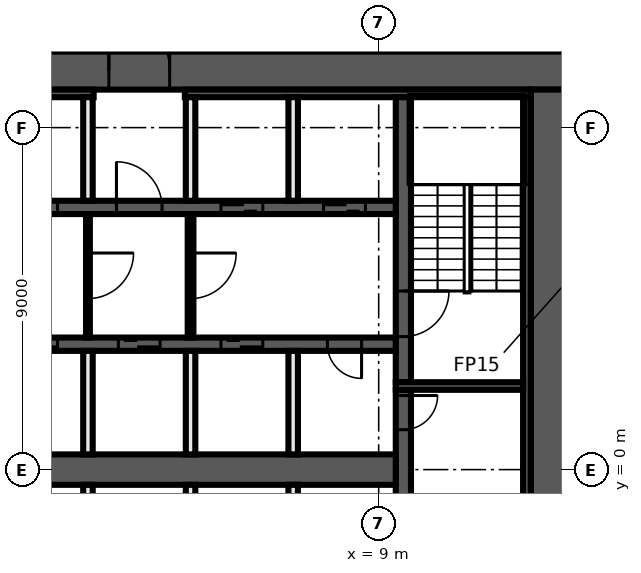
"""IFC4 building model, lengths in metres.
Left out: names, types, materials, properties, quantities, classifications, styles, units other than length and angle.
Written with IfcOpenShell. Run it as: python <this file> out.ifc"""

import sys

from ifc_helpers import new_model, si_unit, direction, frame, frame_2d, origin, place, context, subcontext, project, spatial, rectangle, extrude, element, fill, save


model = new_model("IFC4")
c1 = context("Model", 3, precision=1e-05, world=origin(), true_north=direction((0.0, 1.0)))
c2 = subcontext(c1, "Body", "Model", "MODEL_VIEW")
j1 = project(units=[si_unit("LENGTHUNIT", "METRE"), si_unit("PLANEANGLEUNIT", "RADIAN")], contexts=[c1])
p1 = place(None, origin())
s1 = spatial("IfcSite", under=j1, at=p1, CompositionType="ELEMENT")
p2 = place(p1, origin())
s2 = spatial("IfcBuilding", under=s1, at=p2, CompositionType="ELEMENT")
p3 = place(p2, frame((0.0, 0.0, 102.6)))
s3 = spatial("IfcBuildingStorey", under=s2, at=p3, CompositionType="ELEMENT", Elevation=102.6)
for number, where, z_axis, x_axis in (
    (1, (3.6, 11.0, 0.0), (0.0, 0.0, 1.0), (0.0, 1.0, 0.0)),
    (2, (1.8, 11.0, 0.0), (0.0, 0.0, 1.0), (0.0, 1.0, 0.0)),
):
    element("IfcWall", number, at=place(p3, frame(where, z_axis=z_axis, x_axis=x_axis)), inside=s3, PredefinedType="PARTITIONING", context=c2, shape_type="SweptSolid", body=[
        extrude(rectangle(XDim=1.175, YDim=0.15, at=frame_2d((0.587, 0.0))), origin(), (0.0, 0.0, 1.0), 3.3),
    ])
p4 = place(p3, frame((-14.0, 10.5, 0.0), z_axis=(0.0, 0.0, 1.0), x_axis=(1.0, 0.0, 0.0)))
e3 = element("IfcWall", 3, at=p4, inside=s3, PredefinedType="SHEAR", context=c2, shape_type="SweptSolid", body=[
    extrude(rectangle(XDim=28.0, YDim=1.0, at=frame_2d((14.0, 0.0))), origin(), (0.0, 0.0, 1.0), 3.3),
])
p5 = place(p4, frame((15.9, 0.0, 0.0)))
e4 = element("IfcOpeningElement", 4, at=p5, cuts=e3, PredefinedType="OPENING", context=c2, shape_type="SweptSolid", body=[
    extrude(rectangle(XDim=1.6, YDim=2.1, at=frame_2d((0.8, 1.05))), frame((0.0, 0.51, 0.0), z_axis=(0.0, -1.0, 0.0), x_axis=(1.0, 0.0, 0.0)), (0.0, 0.0, 1.0), 1.02),
])
p6 = place(p3, frame((13.5, 10.0, 0.0), z_axis=(0.0, 0.0, 1.0), x_axis=(0.0, -1.0, 0.0)))
e5 = element("IfcWall", 5, at=p6, inside=s3, PredefinedType="SHEAR", context=c2, shape_type="SweptSolid", body=[
    extrude(rectangle(XDim=20.0, YDim=1.0, at=frame_2d((10.0, 0.0))), origin(), (0.0, 0.0, 1.0), 3.3),
])
p7 = place(p3, frame((-13.0, 9.9, 0.0), z_axis=(0.0, 0.0, 1.0), x_axis=(1.0, 0.0, 0.0)))
e6 = element("IfcWall", 6, at=p7, inside=s3, PredefinedType="SHEAR", context=c2, shape_type="SweptSolid", body=[
    extrude(rectangle(XDim=14.5, YDim=0.2, at=frame_2d((7.25, 0.0))), origin(), (0.0, 0.0, 1.0), 3.3),
])
p8 = place(p3, frame((3.9, 9.9, 0.0), z_axis=(0.0, 0.0, 1.0), x_axis=(1.0, 0.0, 0.0)))
e7 = element("IfcWall", 7, at=p8, inside=s3, PredefinedType="SHEAR", context=c2, shape_type="SweptSolid", body=[
    extrude(rectangle(XDim=9.1, YDim=0.2, at=frame_2d((4.55, 0.0))), origin(), (0.0, 0.0, 1.0), 3.3),
])
p9 = place(p3, frame((12.9, 9.8, 0.0), z_axis=(0.0, 0.0, 1.0), x_axis=(0.0, -1.0, 0.0)))
e8 = element("IfcWall", 8, at=p9, inside=s3, PredefinedType="SHEAR", context=c2, shape_type="SweptSolid", body=[
    extrude(rectangle(XDim=19.6, YDim=0.2, at=frame_2d((9.8, 0.0))), origin(), (0.0, 0.0, 1.0), 3.3),
])
p10 = place(p3, frame((9.65, 2.1, 0.0), z_axis=(0.0, 0.0, 1.0), x_axis=(0.0, -1.0, 0.0)))
e9 = element("IfcWall", 9, at=p10, inside=s3, PredefinedType="SHEAR", context=c2, shape_type="SweptSolid", body=[
    extrude(rectangle(XDim=4.2, YDim=0.4, at=frame_2d((2.1, 0.0))), origin(), (0.0, 0.0, 1.0), 3.3),
])
p11 = place(p10, frame((0.15, 0.0, 0.0)))
e10 = element("IfcOpeningElement", 10, at=p11, cuts=e9, PredefinedType="OPENING", context=c2, shape_type="SweptSolid", body=[
    extrude(rectangle(XDim=0.9, YDim=2.1, at=frame_2d((0.45, 1.05))), frame((0.0, 0.21, 0.0), z_axis=(0.0, -1.0, 0.0), x_axis=(1.0, 0.0, 0.0)), (0.0, 0.0, 1.0), 0.42),
])
p12 = place(p3, frame((9.65, 9.8, 0.0), z_axis=(0.0, 0.0, 1.0), x_axis=(0.0, -1.0, 0.0)))
e11 = element("IfcWall", 11, at=p12, inside=s3, PredefinedType="SHEAR", context=c2, shape_type="SweptSolid", body=[
    extrude(rectangle(XDim=7.5, YDim=0.4, at=frame_2d((3.75, 0.0))), origin(), (0.0, 0.0, 1.0), 3.3),
])
p13 = place(p12, frame((5.1, 0.0, 0.0)))
e12 = element("IfcOpeningElement", 12, at=p13, cuts=e11, PredefinedType="OPENING", context=c2, shape_type="SweptSolid", body=[
    extrude(rectangle(XDim=1.2, YDim=2.1, at=frame_2d((0.6, 1.05))), frame((0.0, 0.21, 0.0), z_axis=(0.0, -1.0, 0.0), x_axis=(1.0, 0.0, 0.0)), (0.0, 0.0, 1.0), 0.42),
])
p14 = place(p3, frame((9.45, 2.2, 0.0), z_axis=(0.0, 0.0, 1.0), x_axis=(1.0, 0.0, 0.0)))
e13 = element("IfcWall", 13, at=p14, inside=s3, PredefinedType="SHEAR", context=c2, shape_type="SweptSolid", body=[
    extrude(rectangle(XDim=3.35, YDim=0.2, at=frame_2d((1.675, 0.0))), origin(), (0.0, 0.0, 1.0), 3.3),
])
p15 = place(p3, frame((-9.45, 6.9, 0.0), z_axis=(0.0, 0.0, 1.0), x_axis=(1.0, 0.0, 0.0)))
e14 = element("IfcWall", 14, at=p15, inside=s3, PredefinedType="SHEAR", context=c2, shape_type="SweptSolid", body=[
    extrude(rectangle(XDim=18.9, YDim=0.35, at=frame_2d((9.45, 0.0))), origin(), (0.0, 0.0, 1.0), 3.3),
])
p16 = place(p15, frame((0.8, 0.0, 0.0)))
e15 = element("IfcOpeningElement", 15, at=p16, cuts=e14, PredefinedType="OPENING", context=c2, shape_type="SweptSolid", body=[
    extrude(rectangle(XDim=1.1, YDim=2.1, at=frame_2d((0.55, 1.05))), frame((0.0, 0.185, 0.0), z_axis=(0.0, -1.0, 0.0), x_axis=(1.0, 0.0, 0.0)), (0.0, 0.0, 1.0), 0.37),
])
p17 = place(p15, frame((3.5, 0.0, 0.0)))
e16 = element("IfcOpeningElement", 16, at=p17, cuts=e14, PredefinedType="OPENING", context=c2, shape_type="SweptSolid", body=[
    extrude(rectangle(XDim=1.1, YDim=2.1, at=frame_2d((0.55, 1.05))), frame((0.0, 0.185, 0.0), z_axis=(0.0, -1.0, 0.0), x_axis=(1.0, 0.0, 0.0)), (0.0, 0.0, 1.0), 0.37),
])
p18 = place(p15, frame((6.2, 0.0, 0.0)))
e17 = element("IfcOpeningElement", 17, at=p18, cuts=e14, PredefinedType="OPENING", context=c2, shape_type="SweptSolid", body=[
    extrude(rectangle(XDim=1.1, YDim=2.1, at=frame_2d((0.55, 1.05))), frame((0.0, 0.185, 0.0), z_axis=(0.0, -1.0, 0.0), x_axis=(1.0, 0.0, 0.0)), (0.0, 0.0, 1.0), 0.37),
])
p19 = place(p15, frame((8.9, 0.0, 0.0)))
e18 = element("IfcOpeningElement", 18, at=p19, cuts=e14, PredefinedType="OPENING", context=c2, shape_type="SweptSolid", body=[
    extrude(rectangle(XDim=1.1, YDim=2.1, at=frame_2d((0.55, 1.05))), frame((0.0, 0.185, 0.0), z_axis=(0.0, -1.0, 0.0), x_axis=(1.0, 0.0, 0.0)), (0.0, 0.0, 1.0), 0.37),
])
p20 = place(p15, frame((11.55, 0.0, 0.0)))
e19 = element("IfcOpeningElement", 19, at=p20, cuts=e14, PredefinedType="OPENING", context=c2, shape_type="SweptSolid", body=[
    extrude(rectangle(XDim=1.2, YDim=2.1, at=frame_2d((0.6, 1.05))), frame((0.0, 0.185, 0.0), z_axis=(0.0, -1.0, 0.0), x_axis=(1.0, 0.0, 0.0)), (0.0, 0.0, 1.0), 0.37),
])
p21 = place(p15, frame((14.3, 0.0, 0.0)))
e20 = element("IfcOpeningElement", 20, at=p21, cuts=e14, PredefinedType="OPENING", context=c2, shape_type="SweptSolid", body=[
    extrude(rectangle(XDim=1.1, YDim=2.1, at=frame_2d((0.55, 1.05))), frame((0.0, 0.185, 0.0), z_axis=(0.0, -1.0, 0.0), x_axis=(1.0, 0.0, 0.0)), (0.0, 0.0, 1.0), 0.37),
])
p22 = place(p15, frame((17.0, 0.0, 0.0)))
e21 = element("IfcOpeningElement", 21, at=p22, cuts=e14, PredefinedType="OPENING", context=c2, shape_type="SweptSolid", body=[
    extrude(rectangle(XDim=1.1, YDim=2.1, at=frame_2d((0.55, 1.05))), frame((0.0, 0.185, 0.0), z_axis=(0.0, -1.0, 0.0), x_axis=(1.0, 0.0, 0.0)), (0.0, 0.0, 1.0), 0.37),
])
p23 = place(p3, frame((9.45, 3.3, 0.0), z_axis=(0.0, 0.0, 1.0), x_axis=(-1.0, 0.0, 0.0)))
e22 = element("IfcWall", 22, at=p23, inside=s3, PredefinedType="SHEAR", context=c2, shape_type="SweptSolid", body=[
    extrude(rectangle(XDim=18.9, YDim=0.35, at=frame_2d((9.45, 0.0))), origin(), (0.0, 0.0, 1.0), 3.3),
])
p24 = place(p23, frame((17.0, 0.0, 0.0)))
e23 = element("IfcOpeningElement", 23, at=p24, cuts=e22, PredefinedType="OPENING", context=c2, shape_type="SweptSolid", body=[
    extrude(rectangle(XDim=1.1, YDim=2.1, at=frame_2d((0.55, 1.05))), frame((0.0, 0.185, 0.0), z_axis=(0.0, -1.0, 0.0), x_axis=(1.0, 0.0, 0.0)), (0.0, 0.0, 1.0), 0.37),
])
p25 = place(p23, frame((14.3, 0.0, 0.0)))
e24 = element("IfcOpeningElement", 24, at=p25, cuts=e22, PredefinedType="OPENING", context=c2, shape_type="SweptSolid", body=[
    extrude(rectangle(XDim=1.1, YDim=2.1, at=frame_2d((0.55, 1.05))), frame((0.0, 0.185, 0.0), z_axis=(0.0, -1.0, 0.0), x_axis=(1.0, 0.0, 0.0)), (0.0, 0.0, 1.0), 0.37),
])
p26 = place(p23, frame((11.6, 0.0, 0.0)))
e25 = element("IfcOpeningElement", 25, at=p26, cuts=e22, PredefinedType="OPENING", context=c2, shape_type="SweptSolid", body=[
    extrude(rectangle(XDim=1.1, YDim=2.1, at=frame_2d((0.55, 1.05))), frame((0.0, 0.185, 0.0), z_axis=(0.0, -1.0, 0.0), x_axis=(1.0, 0.0, 0.0)), (0.0, 0.0, 1.0), 0.37),
])
p27 = place(p23, frame((8.9, 0.0, 0.0)))
e26 = element("IfcOpeningElement", 26, at=p27, cuts=e22, PredefinedType="OPENING", context=c2, shape_type="SweptSolid", body=[
    extrude(rectangle(XDim=1.1, YDim=2.1, at=frame_2d((0.55, 1.05))), frame((0.0, 0.185, 0.0), z_axis=(0.0, -1.0, 0.0), x_axis=(1.0, 0.0, 0.0)), (0.0, 0.0, 1.0), 0.37),
])
p28 = place(p23, frame((6.2, 0.0, 0.0)))
e27 = element("IfcOpeningElement", 27, at=p28, cuts=e22, PredefinedType="OPENING", context=c2, shape_type="SweptSolid", body=[
    extrude(rectangle(XDim=1.1, YDim=2.1, at=frame_2d((0.55, 1.05))), frame((0.0, 0.185, 0.0), z_axis=(0.0, -1.0, 0.0), x_axis=(1.0, 0.0, 0.0)), (0.0, 0.0, 1.0), 0.37),
])
p29 = place(p23, frame((3.5, 0.0, 0.0)))
e28 = element("IfcOpeningElement", 28, at=p29, cuts=e22, PredefinedType="OPENING", context=c2, shape_type="SweptSolid", body=[
    extrude(rectangle(XDim=1.1, YDim=2.1, at=frame_2d((0.55, 1.05))), frame((0.0, 0.185, 0.0), z_axis=(0.0, -1.0, 0.0), x_axis=(1.0, 0.0, 0.0)), (0.0, 0.0, 1.0), 0.37),
])
p30 = place(p23, frame((0.9, 0.0, 0.0)))
e29 = element("IfcOpeningElement", 29, at=p30, cuts=e22, PredefinedType="OPENING", context=c2, shape_type="SweptSolid", body=[
    extrude(rectangle(XDim=0.9, YDim=2.1, at=frame_2d((0.45, 1.05))), frame((0.0, 0.185, 0.0), z_axis=(0.0, -1.0, 0.0), x_axis=(1.0, 0.0, 0.0)), (0.0, 0.0, 1.0), 0.37),
])
p31 = place(p3, frame((-9.45, 0.0, 0.0), z_axis=(0.0, 0.0, 1.0), x_axis=(1.0, 0.0, 0.0)))
e30 = element("IfcWall", 30, at=p31, inside=s3, PredefinedType="SHEAR", context=c2, shape_type="SweptSolid", body=[
    extrude(rectangle(XDim=18.9, YDim=0.8, at=frame_2d((9.45, 0.0))), origin(), (0.0, 0.0, 1.0), 3.3),
])
for number, where, z_axis, x_axis in (
    (31, (6.75, -3.125, 0.0), (0.0, 0.0, 1.0), (0.0, 1.0, 0.0)),
    (32, (6.75, 0.4, 0.0), (0.0, 0.0, 1.0), (0.0, 1.0, 0.0)),
    (33, (6.75, 7.075, 0.0), (0.0, 0.0, 1.0), (0.0, 1.0, 0.0)),
):
    element("IfcWall", number, at=place(p3, frame(where, z_axis=z_axis, x_axis=x_axis)), inside=s3, PredefinedType="SOLIDWALL", context=c2, shape_type="SweptSolid", body=[
        extrude(rectangle(XDim=2.725, YDim=0.25, at=frame_2d((1.363, 0.0))), origin(), (0.0, 0.0, 1.0), 3.3),
    ])
p32 = place(p3, frame((4.05, 6.725, 0.0), z_axis=(0.0, 0.0, 1.0), x_axis=(0.0, -1.0, 0.0)))
e34 = element("IfcWall", 34, at=p32, inside=s3, PredefinedType="PARTITIONING", context=c2, shape_type="SweptSolid", body=[
    extrude(rectangle(XDim=3.25, YDim=0.15, at=frame_2d((1.625, 0.0))), origin(), (0.0, 0.0, 1.0), 3.3),
])
p33 = place(p32, frame((1.025, 0.0, 0.0)))
e35 = element("IfcOpeningElement", 35, at=p33, cuts=e34, PredefinedType="OPENING", context=c2, shape_type="SweptSolid", body=[
    extrude(rectangle(XDim=1.2, YDim=2.1, at=frame_2d((0.6, 1.05))), frame((0.0, 0.085, 0.0), z_axis=(0.0, -1.0, 0.0), x_axis=(1.0, 0.0, 0.0)), (0.0, 0.0, 1.0), 0.17),
])
for number, where, z_axis, x_axis in (
    (36, (4.05, -3.125, 0.0), (0.0, 0.0, 1.0), (0.0, 1.0, 0.0)),
    (37, (4.05, 0.4, 0.0), (0.0, 0.0, 1.0), (0.0, 1.0, 0.0)),
    (38, (4.05, 7.075, 0.0), (0.0, 0.0, 1.0), (0.0, 1.0, 0.0)),
):
    element("IfcWall", number, at=place(p3, frame(where, z_axis=z_axis, x_axis=x_axis)), inside=s3, PredefinedType="SOLIDWALL", context=c2, shape_type="SweptSolid", body=[
        extrude(rectangle(XDim=2.725, YDim=0.25, at=frame_2d((1.363, 0.0))), origin(), (0.0, 0.0, 1.0), 3.3),
    ])
p34 = place(p3, frame((1.35, 6.725, 0.0), z_axis=(0.0, 0.0, 1.0), x_axis=(0.0, -1.0, 0.0)))
e39 = element("IfcWall", 39, at=p34, inside=s3, PredefinedType="PARTITIONING", context=c2, shape_type="SweptSolid", body=[
    extrude(rectangle(XDim=3.25, YDim=0.1, at=frame_2d((1.625, 0.0))), origin(), (0.0, 0.0, 1.0), 3.3),
])
p35 = place(p34, frame((1.025, 0.0, 0.0)))
e40 = element("IfcOpeningElement", 40, at=p35, cuts=e39, PredefinedType="OPENING", context=c2, shape_type="SweptSolid", body=[
    extrude(rectangle(XDim=1.2, YDim=2.1, at=frame_2d((0.6, 1.05))), frame((0.0, 0.06, 0.0), z_axis=(0.0, -1.0, 0.0), x_axis=(1.0, 0.0, 0.0)), (0.0, 0.0, 1.0), 0.12),
])
for number, where, z_axis, x_axis in (
    (41, (1.35, -3.125, 0.0), (0.0, 0.0, 1.0), (0.0, 1.0, 0.0)),
    (42, (1.35, 0.4, 0.0), (0.0, 0.0, 1.0), (0.0, 1.0, 0.0)),
    (43, (1.35, 7.075, 0.0), (0.0, 0.0, 1.0), (0.0, 1.0, 0.0)),
):
    element("IfcWall", number, at=place(p3, frame(where, z_axis=z_axis, x_axis=x_axis)), inside=s3, PredefinedType="SOLIDWALL", context=c2, shape_type="SweptSolid", body=[
        extrude(rectangle(XDim=2.725, YDim=0.25, at=frame_2d((1.363, 0.0))), origin(), (0.0, 0.0, 1.0), 3.3),
    ])
p36 = place(p11, origin())
e44 = element("IfcDoor", 44, at=p36, inside=s3, OperationType="SINGLE_SWING_RIGHT", PredefinedType="DOOR", context=c2, shape_type="SweptSolid", body=[
    extrude(rectangle(XDim=0.9, YDim=2.1, at=frame_2d((0.45, 1.05))), frame((0.0, 0.025, 0.0), z_axis=(0.0, -1.0, 0.0), x_axis=(1.0, 0.0, 0.0)), (0.0, 0.0, 1.0), 0.05),
])
fill(e10, e44)
p37 = place(p19, origin())
e45 = element("IfcDoor", 45, at=p37, inside=s3, OperationType="DOUBLE_DOOR_SLIDING", PredefinedType="DOOR", context=c2, shape_type="SweptSolid", body=[
    extrude(rectangle(XDim=1.1, YDim=2.1, at=frame_2d((0.55, 1.05))), frame((0.0, 0.025, 0.0), z_axis=(0.0, -1.0, 0.0), x_axis=(1.0, 0.0, 0.0)), (0.0, 0.0, 1.0), 0.05),
])
fill(e18, e45)
p38 = place(p5, origin())
e46 = element("IfcDoor", 46, at=p38, inside=s3, OperationType="DOUBLE_DOOR_SINGLE_SWING", PredefinedType="DOOR", context=c2, shape_type="SweptSolid", body=[
    extrude(rectangle(XDim=1.6, YDim=2.1, at=frame_2d((0.8, 1.05))), frame((0.0, 0.025, 0.0), z_axis=(0.0, -1.0, 0.0), x_axis=(1.0, 0.0, 0.0)), (0.0, 0.0, 1.0), 0.05),
])
fill(e4, e46)
p39 = place(p20, origin())
e47 = element("IfcDoor", 47, at=p39, inside=s3, OperationType="SINGLE_SWING_LEFT", PredefinedType="DOOR", context=c2, shape_type="SweptSolid", body=[
    extrude(rectangle(XDim=1.2, YDim=2.1, at=frame_2d((0.6, 1.05))), frame((0.0, 0.025, 0.0), z_axis=(0.0, -1.0, 0.0), x_axis=(1.0, 0.0, 0.0)), (0.0, 0.0, 1.0), 0.05),
])
fill(e19, e47)
p40 = place(p21, origin())
e48 = element("IfcDoor", 48, at=p40, inside=s3, OperationType="DOUBLE_DOOR_SLIDING", PredefinedType="DOOR", context=c2, shape_type="SweptSolid", body=[
    extrude(rectangle(XDim=1.1, YDim=2.1, at=frame_2d((0.55, 1.05))), frame((0.0, 0.025, 0.0), z_axis=(0.0, -1.0, 0.0), x_axis=(1.0, 0.0, 0.0)), (0.0, 0.0, 1.0), 0.05),
])
fill(e20, e48)
p41 = place(p22, origin())
e49 = element("IfcDoor", 49, at=p41, inside=s3, OperationType="DOUBLE_DOOR_SLIDING", PredefinedType="DOOR", context=c2, shape_type="SweptSolid", body=[
    extrude(rectangle(XDim=1.1, YDim=2.1, at=frame_2d((0.55, 1.05))), frame((0.0, 0.025, 0.0), z_axis=(0.0, -1.0, 0.0), x_axis=(1.0, 0.0, 0.0)), (0.0, 0.0, 1.0), 0.05),
])
fill(e21, e49)
p42 = place(p27, origin())
e50 = element("IfcDoor", 50, at=p42, inside=s3, OperationType="DOUBLE_DOOR_SLIDING", PredefinedType="DOOR", context=c2, shape_type="SweptSolid", body=[
    extrude(rectangle(XDim=1.1, YDim=2.1, at=frame_2d((0.55, 1.05))), frame((0.0, 0.025, 0.0), z_axis=(0.0, -1.0, 0.0), x_axis=(1.0, 0.0, 0.0)), (0.0, 0.0, 1.0), 0.05),
])
fill(e26, e50)
p43 = place(p28, origin())
e51 = element("IfcDoor", 51, at=p43, inside=s3, OperationType="DOUBLE_DOOR_SLIDING", PredefinedType="DOOR", context=c2, shape_type="SweptSolid", body=[
    extrude(rectangle(XDim=1.1, YDim=2.1, at=frame_2d((0.55, 1.05))), frame((0.0, 0.025, 0.0), z_axis=(0.0, -1.0, 0.0), x_axis=(1.0, 0.0, 0.0)), (0.0, 0.0, 1.0), 0.05),
])
fill(e27, e51)
p44 = place(p29, origin())
e52 = element("IfcDoor", 52, at=p44, inside=s3, OperationType="DOUBLE_DOOR_SLIDING", PredefinedType="DOOR", context=c2, shape_type="SweptSolid", body=[
    extrude(rectangle(XDim=1.1, YDim=2.1, at=frame_2d((0.55, 1.05))), frame((0.0, 0.025, 0.0), z_axis=(0.0, -1.0, 0.0), x_axis=(1.0, 0.0, 0.0)), (0.0, 0.0, 1.0), 0.05),
])
fill(e28, e52)
p45 = place(p30, origin())
e53 = element("IfcDoor", 53, at=p45, inside=s3, OperationType="SINGLE_SWING_LEFT", PredefinedType="DOOR", context=c2, shape_type="SweptSolid", body=[
    extrude(rectangle(XDim=0.9, YDim=2.1, at=frame_2d((0.45, 1.05))), frame((0.0, 0.025, 0.0), z_axis=(0.0, -1.0, 0.0), x_axis=(1.0, 0.0, 0.0)), (0.0, 0.0, 1.0), 0.05),
])
fill(e29, e53)
p46 = place(p13, origin())
e54 = element("IfcDoor", 54, at=p46, inside=s3, OperationType="SINGLE_SWING_LEFT", PredefinedType="DOOR", context=c2, shape_type="SweptSolid", body=[
    extrude(rectangle(XDim=1.2, YDim=2.1, at=frame_2d((0.6, 1.05))), frame((0.0, 0.025, 0.0), z_axis=(0.0, -1.0, 0.0), x_axis=(1.0, 0.0, 0.0)), (0.0, 0.0, 1.0), 0.05),
])
fill(e12, e54)
p47 = place(p35, origin())
e55 = element("IfcDoor", 55, at=p47, inside=s3, OperationType="SINGLE_SWING_LEFT", PredefinedType="DOOR", context=c2, shape_type="SweptSolid", body=[
    extrude(rectangle(XDim=1.2, YDim=2.1, at=frame_2d((0.6, 1.05))), frame((0.0, 0.025, 0.0), z_axis=(0.0, -1.0, 0.0), x_axis=(1.0, 0.0, 0.0)), (0.0, 0.0, 1.0), 0.05),
])
fill(e40, e55)
p48 = place(p33, origin())
e56 = element("IfcDoor", 56, at=p48, inside=s3, OperationType="SINGLE_SWING_RIGHT", PredefinedType="DOOR", context=c2, shape_type="SweptSolid", body=[
    extrude(rectangle(XDim=1.2, YDim=2.1, at=frame_2d((0.6, 1.05))), frame((0.0, 0.025, 0.0), z_axis=(0.0, -1.0, 0.0), x_axis=(1.0, 0.0, 0.0)), (0.0, 0.0, 1.0), 0.05),
])
fill(e35, e56)
save(model, sys.argv[1])
